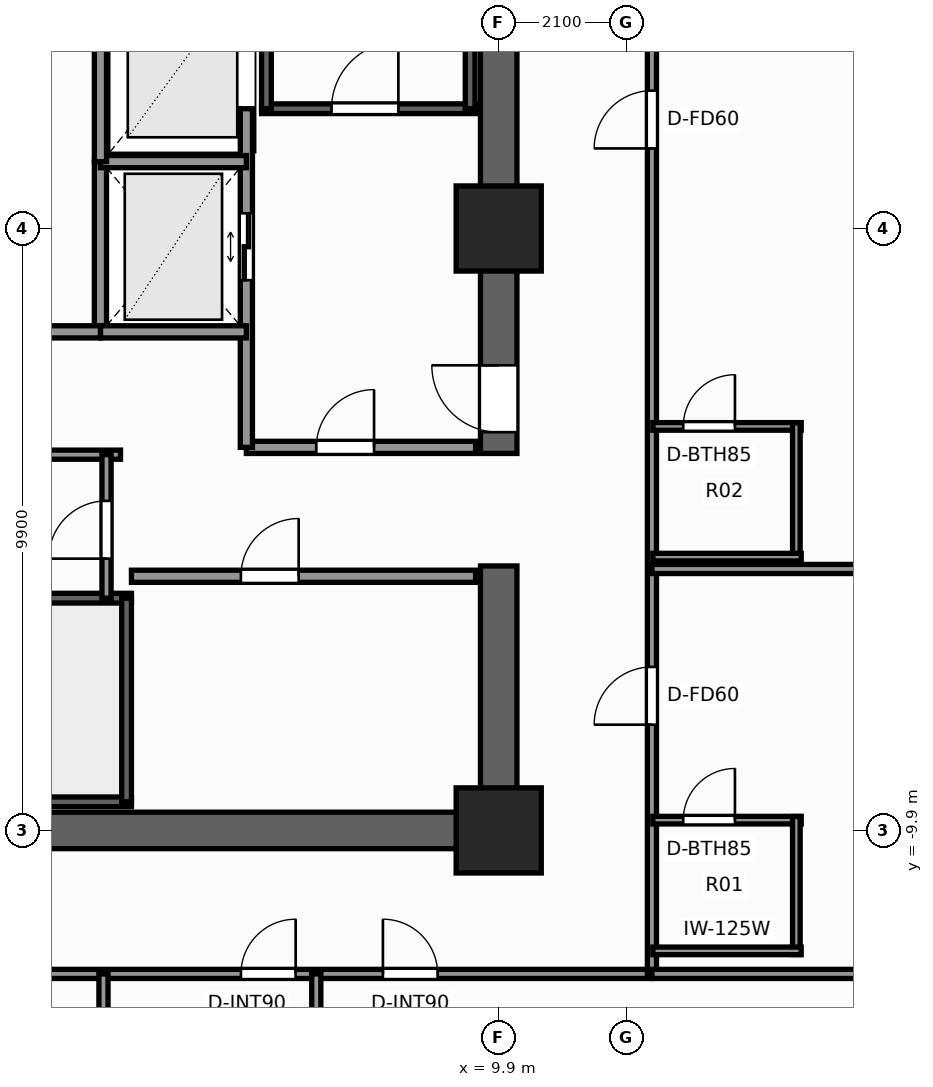
"""IFC4 building model, lengths in metres.
Left out: names, types, materials, properties, quantities, classifications, styles, units other than length and angle.
Written with IfcOpenShell. Run it as: python <this file> out.ifc"""

import sys

from ifc_helpers import new_model, si_unit, direction, frame, frame_2d, origin, origin_2d, place, context, subcontext, project, spatial, rectangle, extrude, element, fill, save


model = new_model("IFC4")
c1 = context("Model", 3, precision=1e-05, world=origin(), true_north=direction((0.0, 1.0)))
c2 = subcontext(c1, "Body", "Model", "MODEL_VIEW")
j1 = project(units=[si_unit("LENGTHUNIT", "METRE"), si_unit("PLANEANGLEUNIT", "RADIAN")], contexts=[c1])
p1 = place(None, origin())
s1 = spatial("IfcSite", under=j1, at=p1, CompositionType="ELEMENT")
p2 = place(p1, origin())
s2 = spatial("IfcBuilding", under=s1, at=p2, CompositionType="ELEMENT")
p3 = place(p2, frame((0.0, 0.0, 30.4)))
s3 = spatial("IfcBuildingStorey", under=s2, at=p3, CompositionType="ELEMENT", Elevation=30.4)
p4 = place(p3, frame((10.2, -9.9, 0.0), z_axis=(0.0, 0.0, 1.0), x_axis=(-1.0, 0.0, 0.0)))
e1 = element("IfcWall", 1, at=p4, inside=s3, PredefinedType="SHEAR", context=c2, shape_type="SweptSolid", body=[
    extrude(rectangle(XDim=12.06, YDim=0.6, at=frame_2d((6.03, 0.0))), origin(), (0.0, 0.0, 1.0), 3.3),
])
p5 = place(p3, frame((9.9, -9.6, 0.0), z_axis=(0.0, 0.0, 1.0), x_axis=(0.0, 1.0, 0.0)))
e2 = element("IfcWall", 2, at=p5, inside=s3, PredefinedType="SHEAR", context=c2, shape_type="SweptSolid", body=[
    extrude(rectangle(XDim=4.05, YDim=0.6, at=frame_2d((2.025, 0.0))), origin(), (0.0, 0.0, 1.0), 3.3),
])
p6 = place(p3, frame((9.9, -3.7, 0.0), z_axis=(0.0, 0.0, 1.0), x_axis=(0.0, 1.0, 0.0)))
e3 = element("IfcWall", 3, at=p6, inside=s3, PredefinedType="SHEAR", context=c2, shape_type="SweptSolid", body=[
    extrude(rectangle(XDim=13.3, YDim=0.6, at=frame_2d((6.65, 0.0))), origin(), (0.0, 0.0, 1.0), 3.3),
])
p7 = place(p6, frame((0.35, 0.0, 0.0)))
e4 = element("IfcOpeningElement", 4, at=p7, cuts=e3, PredefinedType="OPENING", context=c2, shape_type="SweptSolid", body=[
    extrude(rectangle(XDim=1.1, YDim=2.2, at=frame_2d((0.55, 1.1))), frame((0.0, 0.31, 0.0), z_axis=(0.0, -1.0, 0.0), x_axis=(1.0, 0.0, 0.0)), (0.0, 0.0, 1.0), 0.62),
])
for number, where, z_axis, x_axis in (
    (5, (9.9, -9.9, 0.0), (0.0, 0.0, 1.0), (1.0, 0.0, 0.0)),
    (6, (9.9, 0.0, 0.0), (0.0, 0.0, 1.0), (1.0, 0.0, 0.0)),
):
    element("IfcColumn", number, at=place(p3, frame(where, z_axis=z_axis, x_axis=x_axis)), inside=s3, PredefinedType="COLUMN", context=c2, shape_type="SweptSolid", body=[
        extrude(rectangle(XDim=1.4, YDim=1.4, at=origin_2d()), origin(), (0.0, 0.0, 1.0), 3.3),
    ])
p8 = place(p3, frame((6.0, 1.97, 0.0), z_axis=(0.0, 0.0, 1.0), x_axis=(1.0, 0.0, 0.0)))
e7 = element("IfcWall", 7, at=p8, inside=s3, PredefinedType="SHEAR", context=c2, shape_type="SweptSolid", body=[
    extrude(rectangle(XDim=3.52, YDim=0.16, at=frame_2d((1.76, 0.0))), origin(), (0.0, 0.0, 1.0), 3.3),
])
p9 = place(p8, frame((1.15, 0.0, 0.0)))
e8 = element("IfcOpeningElement", 8, at=p9, cuts=e7, PredefinedType="OPENING", context=c2, shape_type="SweptSolid", body=[
    extrude(rectangle(XDim=1.1, YDim=2.2, at=frame_2d((0.55, 1.1))), frame((0.0, 0.09, 0.0), z_axis=(0.0, -1.0, 0.0), x_axis=(1.0, 0.0, 0.0)), (0.0, 0.0, 1.0), 0.18),
])
for number, where, z_axis, x_axis in (
    (9, (6.08, 1.97, 0.0), (0.0, 0.0, 1.0), (0.0, 1.0, 0.0)),
    (10, (9.43, 1.97, 0.0), (0.0, 0.0, 1.0), (0.0, 1.0, 0.0)),
):
    element("IfcWall", number, at=place(p3, frame(where, z_axis=z_axis, x_axis=x_axis)), inside=s3, PredefinedType="SHEAR", context=c2, shape_type="SweptSolid", body=[
        extrude(rectangle(XDim=7.56, YDim=0.16, at=frame_2d((3.78, 0.0))), origin(), (0.0, 0.0, 1.0), 3.3),
    ])
p10 = place(p3, frame((3.86, -9.43, 0.0), z_axis=(0.0, 0.0, 1.0), x_axis=(-1.0, 0.0, 0.0)))
e11 = element("IfcWall", 11, at=p10, inside=s3, PredefinedType="SHEAR", context=c2, shape_type="SweptSolid", body=[
    extrude(rectangle(XDim=7.72, YDim=0.16, at=frame_2d((3.86, 0.0))), origin(), (0.0, 0.0, 1.0), 3.3),
])
p11 = place(p10, frame((6.01, 0.0, 0.0)))
e12 = element("IfcOpeningElement", 12, at=p11, cuts=e11, PredefinedType="OPENING", context=c2, shape_type="SweptSolid", body=[
    extrude(rectangle(XDim=1.1, YDim=2.2, at=frame_2d((0.55, 1.1))), frame((0.0, 0.09, 0.0), z_axis=(0.0, -1.0, 0.0), x_axis=(1.0, 0.0, 0.0)), (0.0, 0.0, 1.0), 0.18),
])
p12 = place(p3, frame((-3.86, -6.08, 0.0), z_axis=(0.0, 0.0, 1.0), x_axis=(1.0, 0.0, 0.0)))
e13 = element("IfcWall", 13, at=p12, inside=s3, PredefinedType="SHEAR", context=c2, shape_type="SweptSolid", body=[
    extrude(rectangle(XDim=7.72, YDim=0.16, at=frame_2d((3.86, 0.0))), origin(), (0.0, 0.0, 1.0), 3.3),
])
p13 = place(p3, frame((3.78, -9.43, 0.0), z_axis=(0.0, 0.0, 1.0), x_axis=(0.0, 1.0, 0.0)))
e14 = element("IfcWall", 14, at=p13, inside=s3, PredefinedType="SHEAR", context=c2, shape_type="SweptSolid", body=[
    extrude(rectangle(XDim=3.35, YDim=0.16, at=frame_2d((1.675, 0.0))), origin(), (0.0, 0.0, 1.0), 3.3),
])
p14 = place(p3, frame((5.75, -3.6, 0.0), z_axis=(0.0, 0.0, 1.0), x_axis=(1.0, 0.0, 0.0)))
e15 = element("IfcWall", 15, at=p14, inside=s3, PredefinedType="SOLIDWALL", context=c2, shape_type="SweptSolid", body=[
    extrude(rectangle(XDim=3.77, YDim=0.2, at=frame_2d((1.885, 0.0))), origin(), (0.0, 0.0, 1.0), 3.06),
])
p15 = place(p14, frame((1.15, 0.0, 0.0)))
e16 = element("IfcOpeningElement", 16, at=p15, cuts=e15, PredefinedType="OPENING", context=c2, shape_type="SweptSolid", body=[
    extrude(rectangle(XDim=0.95, YDim=2.06, at=frame_2d((0.475, 1.03))), frame((0.0, 0.11, 0.0), z_axis=(0.0, -1.0, 0.0), x_axis=(1.0, 0.0, 0.0)), (0.0, 0.0, 1.0), 0.22),
])
p16 = place(p3, frame((5.75, -3.6, 0.0), z_axis=(0.0, 0.0, 1.0), x_axis=(0.0, 1.0, 0.0)))
e17 = element("IfcWall", 17, at=p16, inside=s3, PredefinedType="SOLIDWALL", context=c2, shape_type="SweptSolid", body=[
    extrude(rectangle(XDim=5.57, YDim=0.2, at=frame_2d((2.785, 0.0))), origin(), (0.0, 0.0, 1.0), 3.06),
])
p17 = place(p16, frame((2.75, 0.0, 0.0)))
e18 = element("IfcOpeningElement", 18, at=p17, cuts=e17, PredefinedType="OPENING", context=c2, shape_type="SweptSolid", body=[
    extrude(rectangle(XDim=1.1, YDim=2.2, at=frame_2d((0.55, 1.1))), frame((0.0, 0.11, 0.0), z_axis=(0.0, -1.0, 0.0), x_axis=(1.0, 0.0, 0.0)), (0.0, 0.0, 1.0), 0.22),
])
p18 = place(p3, frame((3.35, -1.7, 0.0), z_axis=(0.0, 0.0, 1.0), x_axis=(0.0, 1.0, 0.0)))
e19 = element("IfcWall", 19, at=p18, inside=s3, PredefinedType="SOLIDWALL", context=c2, shape_type="SweptSolid", body=[
    extrude(rectangle(XDim=2.8, YDim=0.2, at=frame_2d((1.4, 0.0))), origin(), (0.0, 0.0, 1.0), 3.06),
])
for number, where, z_axis, x_axis in (
    (20, (3.35, -1.7, 0.0), (0.0, 0.0, 1.0), (1.0, 0.0, 0.0)),
    (21, (3.35, 1.1, 0.0), (0.0, 0.0, 1.0), (1.0, 0.0, 0.0)),
):
    element("IfcWall", number, at=place(p3, frame(where, z_axis=z_axis, x_axis=x_axis)), inside=s3, PredefinedType="SOLIDWALL", context=c2, shape_type="SweptSolid", body=[
        extrude(rectangle(XDim=2.4, YDim=0.2, at=frame_2d((1.2, 0.0))), origin(), (0.0, 0.0, 1.0), 3.06),
    ])
p19 = place(p3, frame((3.86, -5.72, 0.0), z_axis=(0.0, 0.0, 1.0), x_axis=(1.0, 0.0, 0.0)))
e22 = element("IfcWall", 22, at=p19, inside=s3, PredefinedType="SOLIDWALL", context=c2, shape_type="SweptSolid", body=[
    extrude(rectangle(XDim=5.66, YDim=0.2, at=frame_2d((2.83, 0.0))), origin(), (0.0, 0.0, 1.0), 3.06),
])
p20 = place(p19, frame((1.8, 0.0, 0.0)))
e23 = element("IfcOpeningElement", 23, at=p20, cuts=e22, PredefinedType="OPENING", context=c2, shape_type="SweptSolid", body=[
    extrude(rectangle(XDim=0.95, YDim=2.06, at=frame_2d((0.475, 1.03))), frame((0.0, 0.11, 0.0), z_axis=(0.0, -1.0, 0.0), x_axis=(1.0, 0.0, 0.0)), (0.0, 0.0, 1.0), 0.22),
])
p21 = place(p3, frame((-3.35, -1.7, 0.0), z_axis=(0.0, 0.0, 1.0), x_axis=(1.0, 0.0, 0.0)))
e24 = element("IfcWall", 24, at=p21, inside=s3, PredefinedType="SOLIDWALL", context=c2, shape_type="SweptSolid", body=[
    extrude(rectangle(XDim=6.7, YDim=0.2, at=frame_2d((3.35, 0.0))), origin(), (0.0, 0.0, 1.0), 3.06),
])
p22 = place(p3, frame((3.35, 1.1, 0.0), z_axis=(0.0, 0.0, 1.0), x_axis=(0.0, 1.0, 0.0)))
e25 = element("IfcWall", 25, at=p22, inside=s3, PredefinedType="SOLIDWALL", context=c2, shape_type="SweptSolid", body=[
    extrude(rectangle(XDim=3.2, YDim=0.2, at=frame_2d((1.6, 0.0))), origin(), (0.0, 0.0, 1.0), 3.06),
])
p23 = place(p3, frame((-3.68, -3.72, 0.0), z_axis=(0.0, 0.0, 1.0), x_axis=(1.0, 0.0, 0.0)))
e26 = element("IfcWall", 26, at=p23, inside=s3, PredefinedType="PARTITIONING", context=c2, shape_type="SweptSolid", body=[
    extrude(rectangle(XDim=7.36, YDim=0.15, at=frame_2d((3.68, 0.0))), origin(), (0.0, 0.0, 1.0), 3.06),
])
p24 = place(p3, frame((3.45, -6.08, 0.0), z_axis=(0.0, 0.0, 1.0), x_axis=(0.0, 1.0, 0.0)))
e27 = element("IfcWall", 27, at=p24, inside=s3, PredefinedType="PARTITIONING", context=c2, shape_type="SweptSolid", body=[
    extrude(rectangle(XDim=2.36, YDim=0.15, at=frame_2d((1.18, 0.0))), origin(), (0.0, 0.0, 1.0), 3.06),
])
p25 = place(p24, frame((0.65, 0.0, 0.0)))
e28 = element("IfcOpeningElement", 28, at=p25, cuts=e27, PredefinedType="OPENING", context=c2, shape_type="SweptSolid", body=[
    extrude(rectangle(XDim=0.95, YDim=2.06, at=frame_2d((0.475, 1.03))), frame((0.0, 0.085, 0.0), z_axis=(0.0, -1.0, 0.0), x_axis=(1.0, 0.0, 0.0)), (0.0, 0.0, 1.0), 0.17),
])
p26 = place(p3, frame((-12.26, -12.26, 0.0), z_axis=(0.0, 0.0, 1.0), x_axis=(1.0, 0.0, 0.0)))
e29 = element("IfcWall", 29, at=p26, inside=s3, PredefinedType="PARTITIONING", context=c2, shape_type="SweptSolid", body=[
    extrude(rectangle(XDim=24.68, YDim=0.15, at=frame_2d((12.34, 0.0))), origin(), (0.0, 0.0, 1.0), 2.272),
])
p27 = place(p26, frame((3.444, 0.0, 0.0)))
e30 = element("IfcOpeningElement", 30, at=p27, cuts=e29, PredefinedType="OPENING", context=c2, shape_type="SweptSolid", body=[
    extrude(rectangle(XDim=0.9, YDim=2.06, at=frame_2d((0.45, 1.03))), frame((0.0, 0.085, 0.0), z_axis=(0.0, -1.0, 0.0), x_axis=(1.0, 0.0, 0.0)), (0.0, 0.0, 1.0), 0.17),
])
p28 = place(p26, frame((5.779, 0.0, 0.0)))
e31 = element("IfcOpeningElement", 31, at=p28, cuts=e29, PredefinedType="OPENING", context=c2, shape_type="SweptSolid", body=[
    extrude(rectangle(XDim=0.9, YDim=2.06, at=frame_2d((0.45, 1.03))), frame((0.0, 0.085, 0.0), z_axis=(0.0, -1.0, 0.0), x_axis=(1.0, 0.0, 0.0)), (0.0, 0.0, 1.0), 0.17),
])
p29 = place(p26, frame((13.551, 0.0, 0.0)))
e32 = element("IfcOpeningElement", 32, at=p29, cuts=e29, PredefinedType="OPENING", context=c2, shape_type="SweptSolid", body=[
    extrude(rectangle(XDim=0.9, YDim=2.06, at=frame_2d((0.45, 1.03))), frame((0.0, 0.085, 0.0), z_axis=(0.0, -1.0, 0.0), x_axis=(1.0, 0.0, 0.0)), (0.0, 0.0, 1.0), 0.17),
])
p30 = place(p26, frame((17.921, 0.0, 0.0)))
e33 = element("IfcOpeningElement", 33, at=p30, cuts=e29, PredefinedType="OPENING", context=c2, shape_type="SweptSolid", body=[
    extrude(rectangle(XDim=0.9, YDim=2.06, at=frame_2d((0.45, 1.03))), frame((0.0, 0.085, 0.0), z_axis=(0.0, -1.0, 0.0), x_axis=(1.0, 0.0, 0.0)), (0.0, 0.0, 1.0), 0.17),
])
p31 = place(p26, frame((20.256, 0.0, 0.0)))
e34 = element("IfcOpeningElement", 34, at=p31, cuts=e29, PredefinedType="OPENING", context=c2, shape_type="SweptSolid", body=[
    extrude(rectangle(XDim=0.9, YDim=2.06, at=frame_2d((0.45, 1.03))), frame((0.0, 0.085, 0.0), z_axis=(0.0, -1.0, 0.0), x_axis=(1.0, 0.0, 0.0)), (0.0, 0.0, 1.0), 0.17),
])
p32 = place(p3, frame((12.42, -12.26, 0.0), z_axis=(0.0, 0.0, 1.0), x_axis=(0.0, 1.0, 0.0)))
e35 = element("IfcWall", 35, at=p32, inside=s3, PredefinedType="PARTITIONING", context=c2, shape_type="SweptSolid", body=[
    extrude(rectangle(XDim=24.84, YDim=0.15, at=frame_2d((12.42, 0.0))), origin(), (0.0, 0.0, 1.0), 2.272),
])
p33 = place(p32, frame((4.099, 0.0, 0.0)))
e36 = element("IfcOpeningElement", 36, at=p33, cuts=e35, PredefinedType="OPENING", context=c2, shape_type="SweptSolid", body=[
    extrude(rectangle(XDim=0.95, YDim=2.06, at=frame_2d((0.475, 1.03))), frame((0.0, 0.085, 0.0), z_axis=(0.0, -1.0, 0.0), x_axis=(1.0, 0.0, 0.0)), (0.0, 0.0, 1.0), 0.17),
])
p34 = place(p32, frame((13.577, 0.0, 0.0)))
e37 = element("IfcOpeningElement", 37, at=p34, cuts=e35, PredefinedType="OPENING", context=c2, shape_type="SweptSolid", body=[
    extrude(rectangle(XDim=0.95, YDim=2.06, at=frame_2d((0.475, 1.03))), frame((0.0, 0.085, 0.0), z_axis=(0.0, -1.0, 0.0), x_axis=(1.0, 0.0, 0.0)), (0.0, 0.0, 1.0), 0.17),
])
p35 = place(p32, frame((19.692, 0.0, 0.0)))
e38 = element("IfcOpeningElement", 38, at=p35, cuts=e35, PredefinedType="OPENING", context=c2, shape_type="SweptSolid", body=[
    extrude(rectangle(XDim=0.95, YDim=2.06, at=frame_2d((0.475, 1.03))), frame((0.0, 0.085, 0.0), z_axis=(0.0, -1.0, 0.0), x_axis=(1.0, 0.0, 0.0)), (0.0, 0.0, 1.0), 0.17),
])
p36 = place(p3, frame((12.42, -12.26, 0.0), z_axis=(0.0, 0.0, 1.0), x_axis=(1.0, 0.0, 0.0)))
e39 = element("IfcWall", 39, at=p36, inside=s3, PredefinedType="PARTITIONING", context=c2, shape_type="SweptSolid", body=[
    extrude(rectangle(XDim=9.56, YDim=0.15, at=frame_2d((4.78, 0.0))), origin(), (0.0, 0.0, 1.0), 2.272),
])
for number, where, z_axis, x_axis in (
    (40, (3.4, -21.98, 0.0), (0.0, 0.0, 1.0), (0.0, 1.0, 0.0)),
    (41, (6.9, -21.98, 0.0), (0.0, 0.0, 1.0), (0.0, 1.0, 0.0)),
):
    element("IfcWall", number, at=place(p3, frame(where, z_axis=z_axis, x_axis=x_axis)), inside=s3, PredefinedType="PARTITIONING", context=c2, shape_type="SweptSolid", body=[
        extrude(rectangle(XDim=9.72, YDim=0.15, at=frame_2d((4.86, 0.0))), origin(), (0.0, 0.0, 1.0), 2.429),
    ])
p37 = place(p3, frame((12.42, -5.6, 0.0), z_axis=(0.0, 0.0, 1.0), x_axis=(1.0, 0.0, 0.0)))
e42 = element("IfcWall", 42, at=p37, inside=s3, PredefinedType="PARTITIONING", context=c2, shape_type="SweptSolid", body=[
    extrude(rectangle(XDim=9.56, YDim=0.15, at=frame_2d((4.78, 0.0))), origin(), (0.0, 0.0, 1.0), 2.429),
])
p38 = place(p3, frame((12.435, -9.731, 0.0), z_axis=(0.0, 0.0, 1.0), x_axis=(1.0, 0.0, 0.0)))
e43 = element("IfcWall", 43, at=p38, inside=s3, PredefinedType="PARTITIONING", context=c2, shape_type="SweptSolid", body=[
    extrude(rectangle(XDim=2.44, YDim=0.125, at=frame_2d((1.22, 0.0))), origin(), (0.0, 0.0, 1.0), 3.06),
])
p39 = place(p38, frame((0.5, 0.0, 0.0)))
e44 = element("IfcOpeningElement", 44, at=p39, cuts=e43, PredefinedType="OPENING", context=c2, shape_type="SweptSolid", body=[
    extrude(rectangle(XDim=0.85, YDim=2.03, at=frame_2d((0.425, 1.015))), frame((0.0, 0.073, 0.0), z_axis=(0.0, -1.0, 0.0), x_axis=(1.0, 0.0, 0.0)), (0.0, 0.0, 1.0), 0.145),
])
p40 = place(p3, frame((14.795, -11.941, 0.0), z_axis=(0.0, 0.0, 1.0), x_axis=(0.0, 1.0, 0.0)))
e45 = element("IfcWall", 45, at=p40, inside=s3, PredefinedType="PARTITIONING", context=c2, shape_type="SweptSolid", body=[
    extrude(rectangle(XDim=2.27, YDim=0.125, at=frame_2d((1.135, 0.0))), origin(), (0.0, 0.0, 1.0), 2.272),
])
p41 = place(p3, frame((12.435, -11.881, 0.0), z_axis=(0.0, 0.0, 1.0), x_axis=(1.0, 0.0, 0.0)))
e46 = element("IfcWall", 46, at=p41, inside=s3, PredefinedType="PARTITIONING", context=c2, shape_type="SweptSolid", body=[
    extrude(rectangle(XDim=2.44, YDim=0.125, at=frame_2d((1.22, 0.0))), origin(), (0.0, 0.0, 1.0), 2.272),
])
p42 = place(p3, frame((12.435, -3.255, 0.0), z_axis=(0.0, 0.0, 1.0), x_axis=(1.0, 0.0, 0.0)))
e47 = element("IfcWall", 47, at=p42, inside=s3, PredefinedType="PARTITIONING", context=c2, shape_type="SweptSolid", body=[
    extrude(rectangle(XDim=2.44, YDim=0.125, at=frame_2d((1.22, 0.0))), origin(), (0.0, 0.0, 1.0), 2.349),
])
p43 = place(p42, frame((0.5, 0.0, 0.0)))
e48 = element("IfcOpeningElement", 48, at=p43, cuts=e47, PredefinedType="OPENING", context=c2, shape_type="SweptSolid", body=[
    extrude(rectangle(XDim=0.85, YDim=2.03, at=frame_2d((0.425, 1.015))), frame((0.0, 0.073, 0.0), z_axis=(0.0, -1.0, 0.0), x_axis=(1.0, 0.0, 0.0)), (0.0, 0.0, 1.0), 0.145),
])
p44 = place(p3, frame((14.795, -5.465, 0.0), z_axis=(0.0, 0.0, 1.0), x_axis=(0.0, 1.0, 0.0)))
e49 = element("IfcWall", 49, at=p44, inside=s3, PredefinedType="PARTITIONING", context=c2, shape_type="SweptSolid", body=[
    extrude(rectangle(XDim=2.27, YDim=0.125, at=frame_2d((1.135, 0.0))), origin(), (0.0, 0.0, 1.0), 2.272),
])
p45 = place(p3, frame((12.435, -5.405, 0.0), z_axis=(0.0, 0.0, 1.0), x_axis=(1.0, 0.0, 0.0)))
e50 = element("IfcWall", 50, at=p45, inside=s3, PredefinedType="PARTITIONING", context=c2, shape_type="SweptSolid", body=[
    extrude(rectangle(XDim=2.44, YDim=0.125, at=frame_2d((1.22, 0.0))), origin(), (0.0, 0.0, 1.0), 3.06),
])
p46 = place(p9, origin())
e51 = element("IfcDoor", 51, at=p46, inside=s3, OperationType="SINGLE_SWING_RIGHT", PredefinedType="DOOR", context=c2, shape_type="SweptSolid", body=[
    extrude(rectangle(XDim=1.1, YDim=2.2, at=frame_2d((0.55, 1.1))), frame((0.0, 0.025, 0.0), z_axis=(0.0, -1.0, 0.0), x_axis=(1.0, 0.0, 0.0)), (0.0, 0.0, 1.0), 0.05),
])
fill(e8, e51)
p47 = place(p7, origin())
e52 = element("IfcDoor", 52, at=p47, inside=s3, OperationType="SINGLE_SWING_RIGHT", PredefinedType="DOOR", context=c2, shape_type="SweptSolid", body=[
    extrude(rectangle(XDim=1.1, YDim=2.2, at=frame_2d((0.55, 1.1))), frame((0.0, 0.025, 0.0), z_axis=(0.0, -1.0, 0.0), x_axis=(1.0, 0.0, 0.0)), (0.0, 0.0, 1.0), 0.05),
])
fill(e4, e52)
p48 = place(p17, origin())
e53 = element("IfcDoor", 53, at=p48, inside=s3, OperationType="DOUBLE_DOOR_SLIDING", PredefinedType="DOOR", context=c2, shape_type="SweptSolid", body=[
    extrude(rectangle(XDim=1.1, YDim=2.2, at=frame_2d((0.55, 1.1))), frame((0.0, 0.025, 0.0), z_axis=(0.0, -1.0, 0.0), x_axis=(1.0, 0.0, 0.0)), (0.0, 0.0, 1.0), 0.05),
])
fill(e18, e53)
p49 = place(p20, origin())
e54 = element("IfcDoor", 54, at=p49, inside=s3, OperationType="SINGLE_SWING_RIGHT", PredefinedType="DOOR", context=c2, shape_type="SweptSolid", body=[
    extrude(rectangle(XDim=0.95, YDim=2.06, at=frame_2d((0.475, 1.03))), frame((0.0, 0.025, 0.0), z_axis=(0.0, -1.0, 0.0), x_axis=(1.0, 0.0, 0.0)), (0.0, 0.0, 1.0), 0.05),
])
fill(e23, e54)
p50 = place(p15, origin())
e55 = element("IfcDoor", 55, at=p50, inside=s3, OperationType="SINGLE_SWING_RIGHT", PredefinedType="DOOR", context=c2, shape_type="SweptSolid", body=[
    extrude(rectangle(XDim=0.95, YDim=2.06, at=frame_2d((0.475, 1.03))), frame((0.0, 0.025, 0.0), z_axis=(0.0, -1.0, 0.0), x_axis=(1.0, 0.0, 0.0)), (0.0, 0.0, 1.0), 0.05),
])
fill(e16, e55)
p51 = place(p25, origin())
e56 = element("IfcDoor", 56, at=p51, inside=s3, OperationType="SINGLE_SWING_LEFT", PredefinedType="DOOR", context=c2, shape_type="SweptSolid", body=[
    extrude(rectangle(XDim=0.95, YDim=2.06, at=frame_2d((0.475, 1.03))), frame((0.0, 0.025, 0.0), z_axis=(0.0, -1.0, 0.0), x_axis=(1.0, 0.0, 0.0)), (0.0, 0.0, 1.0), 0.05),
])
fill(e28, e56)
p52 = place(p30, origin())
e57 = element("IfcDoor", 57, at=p52, inside=s3, OperationType="SINGLE_SWING_RIGHT", PredefinedType="DOOR", context=c2, shape_type="SweptSolid", body=[
    extrude(rectangle(XDim=0.9, YDim=2.06, at=frame_2d((0.45, 1.03))), frame((0.0, 0.025, 0.0), z_axis=(0.0, -1.0, 0.0), x_axis=(1.0, 0.0, 0.0)), (0.0, 0.0, 1.0), 0.05),
])
fill(e33, e57)
p53 = place(p31, origin())
e58 = element("IfcDoor", 58, at=p53, inside=s3, OperationType="SINGLE_SWING_LEFT", PredefinedType="DOOR", context=c2, shape_type="SweptSolid", body=[
    extrude(rectangle(XDim=0.9, YDim=2.06, at=frame_2d((0.45, 1.03))), frame((0.0, 0.025, 0.0), z_axis=(0.0, -1.0, 0.0), x_axis=(1.0, 0.0, 0.0)), (0.0, 0.0, 1.0), 0.05),
])
fill(e34, e58)
p54 = place(p39, origin())
e59 = element("IfcDoor", 59, at=p54, inside=s3, OperationType="SINGLE_SWING_RIGHT", PredefinedType="DOOR", context=c2, shape_type="SweptSolid", body=[
    extrude(rectangle(XDim=0.85, YDim=2.03, at=frame_2d((0.425, 1.015))), frame((0.0, 0.025, 0.0), z_axis=(0.0, -1.0, 0.0), x_axis=(1.0, 0.0, 0.0)), (0.0, 0.0, 1.0), 0.05),
])
fill(e44, e59)
p55 = place(p33, origin())
e60 = element("IfcDoor", 60, at=p55, inside=s3, OperationType="SINGLE_SWING_LEFT", PredefinedType="DOOR", context=c2, shape_type="SweptSolid", body=[
    extrude(rectangle(XDim=0.95, YDim=2.06, at=frame_2d((0.475, 1.03))), frame((0.0, 0.025, 0.0), z_axis=(0.0, -1.0, 0.0), x_axis=(1.0, 0.0, 0.0)), (0.0, 0.0, 1.0), 0.05),
])
fill(e36, e60)
p56 = place(p43, origin())
e61 = element("IfcDoor", 61, at=p56, inside=s3, OperationType="SINGLE_SWING_RIGHT", PredefinedType="DOOR", context=c2, shape_type="SweptSolid", body=[
    extrude(rectangle(XDim=0.85, YDim=2.03, at=frame_2d((0.425, 1.015))), frame((0.0, 0.025, 0.0), z_axis=(0.0, -1.0, 0.0), x_axis=(1.0, 0.0, 0.0)), (0.0, 0.0, 1.0), 0.05),
])
fill(e48, e61)
p57 = place(p34, origin())
e62 = element("IfcDoor", 62, at=p57, inside=s3, OperationType="SINGLE_SWING_LEFT", PredefinedType="DOOR", context=c2, shape_type="SweptSolid", body=[
    extrude(rectangle(XDim=0.95, YDim=2.06, at=frame_2d((0.475, 1.03))), frame((0.0, 0.025, 0.0), z_axis=(0.0, -1.0, 0.0), x_axis=(1.0, 0.0, 0.0)), (0.0, 0.0, 1.0), 0.05),
])
fill(e37, e62)
save(model, sys.argv[1])
